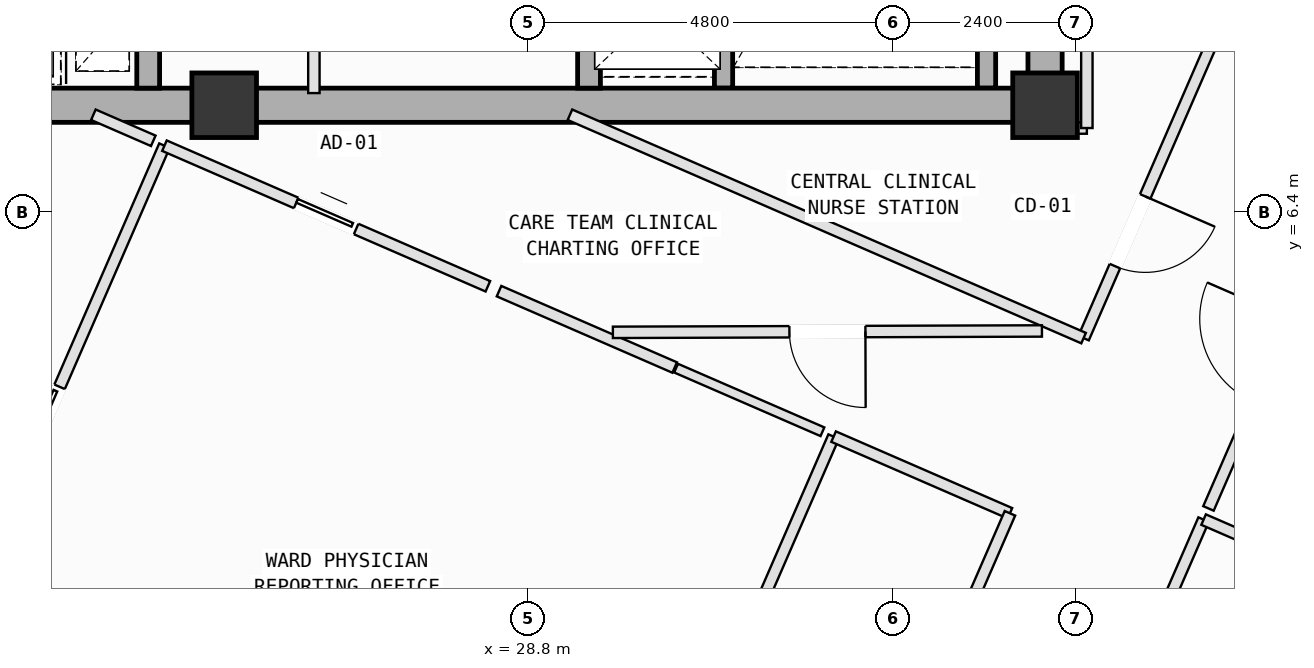
"""IFC4 building model, lengths in metres.
Left out: names, types, materials, properties, quantities, classifications, styles, units other than length and angle.
Written with IfcOpenShell. Run it as: python <this file> out.ifc"""

import sys

from ifc_helpers import new_model, si_unit, direction, frame, frame_2d, origin, origin_2d, place, context, subcontext, project, spatial, rectangle, extrude, element, fill, save


model = new_model("IFC4")
c1 = context("Model", 3, precision=1e-05, world=origin(), true_north=direction((0.0, 1.0)))
c2 = subcontext(c1, "Body", "Model", "MODEL_VIEW")
j1 = project(units=[si_unit("LENGTHUNIT", "METRE"), si_unit("PLANEANGLEUNIT", "RADIAN")], contexts=[c1])
p1 = place(None, origin())
s1 = spatial("IfcSite", under=j1, at=p1, CompositionType="ELEMENT")
p2 = place(p1, origin())
s2 = spatial("IfcBuilding", under=s1, at=p2, CompositionType="ELEMENT")
p3 = place(p2, frame((0.0, 0.0, 324.6)))
s3 = spatial("IfcBuildingStorey", under=s2, at=p3, CompositionType="ELEMENT", Elevation=324.6)
for number, where, z_axis, x_axis in (
    (1, (24.8, 7.8, 0.0), (0.0, 0.0, 1.0), (1.0, 0.0, 0.0)),
    (2, (35.6, 7.8, 0.0), (0.0, 0.0, 1.0), (1.0, 0.0, 0.0)),
):
    element("IfcColumn", number, at=place(p3, frame(where, z_axis=z_axis, x_axis=x_axis)), inside=s3, PredefinedType="COLUMN", context=c2, shape_type="SweptSolid", body=[
        extrude(rectangle(XDim=0.85, YDim=0.85, at=origin_2d()), origin(), (0.0, 0.0, 1.0), 4.0),
    ])
for number, where, z_axis, x_axis in (
    (3, (34.83, 15.12, 0.0), (0.0, 0.0, 1.0), (0.0, -1.0, 0.0)),
    (4, (31.37, 8.025, 0.0), (0.0, 0.0, 1.0), (0.0, 1.0, 0.0)),
):
    element("IfcWall", number, at=place(p3, frame(where, z_axis=z_axis, x_axis=x_axis)), inside=s3, PredefinedType="SOLIDWALL", context=c2, shape_type="SweptSolid", body=[
        extrude(rectangle(XDim=7.095, YDim=0.24, at=frame_2d((3.548, 0.0))), origin(), (0.0, 0.0, 1.0), 3.78),
    ])
for number, where, z_axis, x_axis in (
    (5, (14.0, 7.8, 0.0), (0.0, 0.0, 1.0), (1.0, 0.0, 0.0)),
    (6, (24.8, 7.8, 0.0), (0.0, 0.0, 1.0), (1.0, 0.0, 0.0)),
):
    element("IfcWall", number, at=place(p3, frame(where, z_axis=z_axis, x_axis=x_axis)), inside=s3, PredefinedType="SHEAR", context=c2, shape_type="SweptSolid", body=[
        extrude(rectangle(XDim=10.8, YDim=0.45, at=frame_2d((5.4, 0.0))), origin(), (0.0, 0.0, 1.0), 3.78),
    ])
p4 = place(p3, frame((35.6, 7.8, 0.0), z_axis=(0.0, 0.0, 1.0), x_axis=(0.0, 1.0, 0.0)))
e7 = element("IfcWall", 7, at=p4, inside=s3, PredefinedType="SHEAR", context=c2, shape_type="SweptSolid", body=[
    extrude(rectangle(XDim=9.0, YDim=0.45, at=frame_2d((4.5, 0.0))), origin(), (0.0, 0.0, 1.0), 3.78),
])
p5 = place(p3, frame((23.8, 8.025, 0.0), z_axis=(0.0, 0.0, 1.0), x_axis=(0.0, 1.0, 0.0)))
e8 = element("IfcWall", 8, at=p5, inside=s3, PredefinedType="SOLIDWALL", context=c2, shape_type="SweptSolid", body=[
    extrude(rectangle(XDim=2.655, YDim=0.3, at=frame_2d((1.328, 0.0))), origin(), (0.0, 0.0, 1.0), 3.78),
])
p6 = place(p3, frame((29.6, 8.025, 0.0), z_axis=(0.0, 0.0, 1.0), x_axis=(0.0, 1.0, 0.0)))
e9 = element("IfcWall", 9, at=p6, inside=s3, PredefinedType="SOLIDWALL", context=c2, shape_type="SweptSolid", body=[
    extrude(rectangle(XDim=1.995, YDim=0.3, at=frame_2d((0.998, 0.0))), origin(), (0.0, 0.0, 1.0), 3.78),
])
p7 = place(p3, frame((25.98, 7.96, 0.0), z_axis=(0.0, 0.0, 1.0), x_axis=(0.0, 1.0, 0.0)))
e10 = element("IfcWall", 10, at=p7, inside=s3, PredefinedType="PARTITIONING", context=c2, shape_type="SweptSolid", body=[
    extrude(rectangle(XDim=4.04, YDim=0.15, at=frame_2d((2.02, 0.0))), origin(), (0.0, 0.0, 1.0), 3.78),
])
p8 = place(p7, frame((1.695, 0.0, 0.0)))
e11 = element("IfcOpeningElement", 11, at=p8, cuts=e10, PredefinedType="OPENING", context=c2, shape_type="SweptSolid", body=[
    extrude(rectangle(XDim=1.0, YDim=2.12, at=frame_2d((0.5, 1.06))), frame((0.0, 0.085, 0.0), z_axis=(0.0, -1.0, 0.0), x_axis=(1.0, 0.0, 0.0)), (0.0, 0.0, 1.0), 0.17),
])
p9 = place(p3, frame((35.996, -1.54, 0.0), z_axis=(0.0, 0.0, 1.0), x_axis=(0.398633453706, 0.917110336648, 0.0)))
e12 = element("IfcWall", 12, at=p9, inside=s3, PredefinedType="PARTITIONING", context=c2, shape_type="SweptSolid", body=[
    extrude(rectangle(XDim=4.239, YDim=0.15, at=frame_2d((2.12, 0.0))), origin(), (0.0, 0.0, 1.0), 3.78),
])
p10 = place(p9, frame((1.52, 0.0, 0.0)))
e13 = element("IfcOpeningElement", 13, at=p10, cuts=e12, PredefinedType="OPENING", context=c2, shape_type="SweptSolid", body=[
    extrude(rectangle(XDim=1.2, YDim=2.15, at=frame_2d((0.6, 1.075))), frame((0.0, 0.085, 0.0), z_axis=(0.0, -1.0, 0.0), x_axis=(1.0, 0.0, 0.0)), (0.0, 0.0, 1.0), 0.17),
])
p11 = place(p3, frame((37.686, 2.348, 0.0), z_axis=(0.0, 0.0, 1.0), x_axis=(0.917079517358, -0.398704350167, 0.0)))
e14 = element("IfcWall", 14, at=p11, inside=s3, PredefinedType="PARTITIONING", context=c2, shape_type="SweptSolid", body=[
    extrude(rectangle(XDim=9.436, YDim=0.15, at=frame_2d((4.718, 0.0))), origin(), (0.0, 0.0, 1.0), 3.78),
])
p12 = place(p3, frame((37.75, 2.495, 0.0), z_axis=(0.0, 0.0, 1.0), x_axis=(0.398827178626, 0.917026107365, 0.0)))
e15 = element("IfcWall", 15, at=p12, inside=s3, PredefinedType="PARTITIONING", context=c2, shape_type="SweptSolid", body=[
    extrude(rectangle(XDim=4.24, YDim=0.15, at=frame_2d((2.12, 0.0))), origin(), (0.0, 0.0, 1.0), 3.78),
])
p13 = place(p12, frame((1.52, 0.0, 0.0)))
e16 = element("IfcOpeningElement", 16, at=p13, cuts=e15, PredefinedType="OPENING", context=c2, shape_type="SweptSolid", body=[
    extrude(rectangle(XDim=1.2, YDim=2.15, at=frame_2d((0.6, 1.075))), frame((0.0, 0.085, 0.0), z_axis=(0.0, -1.0, 0.0), x_axis=(1.0, 0.0, 0.0)), (0.0, 0.0, 1.0), 0.17),
])
p14 = place(p3, frame((29.853, -3.378, 0.0), z_axis=(0.0, 0.0, 1.0), x_axis=(0.398816165707, 0.917030896956, 0.0)))
e17 = element("IfcWall", 17, at=p14, inside=s3, PredefinedType="PARTITIONING", context=c2, shape_type="SweptSolid", body=[
    extrude(rectangle(XDim=7.435, YDim=0.15, at=frame_2d((3.717, 0.0))), origin(), (0.0, 0.0, 1.0), 3.78),
])
p15 = place(p3, frame((32.818, 3.44, 0.0), z_axis=(0.0, 0.0, 1.0), x_axis=(0.917010208472, -0.398863733068, 0.0)))
e18 = element("IfcWall", 18, at=p15, inside=s3, PredefinedType="PARTITIONING", context=c2, shape_type="SweptSolid", body=[
    extrude(rectangle(XDim=2.53, YDim=0.15, at=frame_2d((1.265, 0.0))), origin(), (0.0, 0.0, 1.0), 3.78),
])
p16 = place(p3, frame((35.138, 2.431, 0.0), z_axis=(0.0, 0.0, 1.0), x_axis=(-0.398810806125, -0.917033227816, 0.0)))
e19 = element("IfcWall", 19, at=p16, inside=s3, PredefinedType="PARTITIONING", context=c2, shape_type="SweptSolid", body=[
    extrude(rectangle(XDim=5.903, YDim=0.15, at=frame_2d((2.951, 0.0))), origin(), (0.0, 0.0, 1.0), 2.765),
])
p17 = place(p16, frame((2.351, 0.0, 0.0)))
e20 = element("IfcOpeningElement", 20, at=p17, cuts=e19, PredefinedType="OPENING", context=c2, shape_type="SweptSolid", body=[
    extrude(rectangle(XDim=1.2, YDim=2.15, at=frame_2d((0.6, 1.075))), frame((0.0, 0.085, 0.0), z_axis=(0.0, -1.0, 0.0), x_axis=(1.0, 0.0, 0.0)), (0.0, 0.0, 1.0), 0.17),
])
p18 = place(p3, frame((28.416, 5.354, 0.0), z_axis=(0.0, 0.0, 1.0), x_axis=(0.917057734147, -0.398754451062, 0.0)))
e21 = element("IfcWall", 21, at=p18, inside=s3, PredefinedType="PARTITIONING", context=c2, shape_type="SweptSolid", body=[
    extrude(rectangle(XDim=2.52, YDim=0.15, at=frame_2d((1.26, 0.0))), origin(), (0.0, 0.0, 1.0), 3.78),
])
p19 = place(p3, frame((30.745, 4.341, 0.0), z_axis=(0.0, 0.0, 1.0), x_axis=(0.917094083809, -0.398670843481, 0.0)))
e22 = element("IfcWall", 22, at=p19, inside=s3, PredefinedType="PARTITIONING", context=c2, shape_type="SweptSolid", body=[
    extrude(rectangle(XDim=2.1, YDim=0.125, at=frame_2d((1.05, 0.0))), origin(), (0.0, 0.0, 1.0), 3.78),
])
p20 = place(p3, frame((20.912, 0.134, 0.0), z_axis=(0.0, 0.0, 1.0), x_axis=(0.398731849313, 0.917067561493, 0.0)))
e23 = element("IfcWall", 23, at=p20, inside=s3, PredefinedType="PARTITIONING", context=c2, shape_type="SweptSolid", body=[
    extrude(rectangle(XDim=7.779, YDim=0.15, at=frame_2d((3.89, 0.0))), origin(), (0.0, 0.0, 1.0), 2.765),
])
p21 = place(p20, frame((3.46, 0.0, 0.0)))
e24 = element("IfcOpeningElement", 24, at=p21, cuts=e23, PredefinedType="OPENING", context=c2, shape_type="SweptSolid", body=[
    extrude(rectangle(XDim=0.86, YDim=2.06, at=frame_2d((0.43, 1.03))), frame((0.0, 0.085, 0.0), z_axis=(0.0, -1.0, 0.0), x_axis=(1.0, 0.0, 0.0)), (0.0, 0.0, 1.0), 0.17),
])
p22 = place(p3, frame((24.014, 7.268, 0.0), z_axis=(0.0, 0.0, 1.0), x_axis=(0.91706671013, -0.398733807411, 0.0)))
e25 = element("IfcWall", 25, at=p22, inside=s3, PredefinedType="PARTITIONING", context=c2, shape_type="SweptSolid", body=[
    extrude(rectangle(XDim=4.64, YDim=0.15, at=frame_2d((2.32, 0.0))), origin(), (0.0, 0.0, 1.0), 3.78),
])
p23 = place(p22, frame((1.89, 0.0, 0.0)))
e26 = element("IfcOpeningElement", 26, at=p23, cuts=e25, PredefinedType="OPENING", context=c2, shape_type="SweptSolid", body=[
    extrude(rectangle(XDim=0.86, YDim=2.06, at=frame_2d((0.43, 1.03))), frame((0.0, 0.085, 0.0), z_axis=(0.0, -1.0, 0.0), x_axis=(1.0, 0.0, 0.0)), (0.0, 0.0, 1.0), 0.17),
])
p24 = place(p3, frame((23.079, 7.675, 0.0), z_axis=(0.0, 0.0, 1.0), x_axis=(0.91686666905, -0.399193576082, 0.0)))
e27 = element("IfcWall", 27, at=p24, inside=s3, PredefinedType="PARTITIONING", context=c2, shape_type="SweptSolid", body=[
    extrude(rectangle(XDim=0.859, YDim=0.15, at=frame_2d((0.43, 0.0))), origin(), (0.0, 0.0, 1.0), 3.78),
])
p25 = place(p3, frame((38.035, 9.17, 0.0), z_axis=(0.0, 0.0, 1.0), x_axis=(-0.398764886009, -0.917053196759, 0.0)))
e28 = element("IfcWall", 28, at=p25, inside=s3, PredefinedType="PARTITIONING", context=c2, shape_type="SweptSolid", body=[
    extrude(rectangle(XDim=4.835, YDim=0.15, at=frame_2d((2.417, 0.0))), origin(), (0.0, 0.0, 1.0), 3.78),
])
p26 = place(p25, frame((2.802, 0.0, 0.0)))
e29 = element("IfcOpeningElement", 29, at=p26, cuts=e28, PredefinedType="OPENING", context=c2, shape_type="SweptSolid", body=[
    extrude(rectangle(XDim=1.0, YDim=2.12, at=frame_2d((0.5, 1.06))), frame((0.0, 0.085, 0.0), z_axis=(0.0, -1.0, 0.0), x_axis=(1.0, 0.0, 0.0)), (0.0, 0.0, 1.0), 0.17),
])
p27 = place(p3, frame((36.107, 4.736, 0.0), z_axis=(0.0, 0.0, 1.0), x_axis=(-0.917031075712, 0.398815754676, 0.0)))
e30 = element("IfcWall", 30, at=p27, inside=s3, PredefinedType="PARTITIONING", context=c2, shape_type="SweptSolid", body=[
    extrude(rectangle(XDim=7.369, YDim=0.15, at=frame_2d((3.685, 0.0))), origin(), (0.0, 0.0, 1.0), 3.78),
])
p28 = place(p3, frame((35.6, 7.5, 0.0), z_axis=(0.0, 0.0, 1.0), x_axis=(1.0, 0.0, 0.0)))
e31 = element("IfcWall", 31, at=p28, inside=s3, PredefinedType="PARTITIONING", context=c2, shape_type="SweptSolid", body=[
    extrude(rectangle(XDim=0.55, YDim=0.15, at=frame_2d((0.275, 0.0))), origin(), (0.0, 0.0, 1.0), 2.765),
])
p29 = place(p3, frame((36.15, 7.5, 0.0), z_axis=(0.0, 0.0, 1.0), x_axis=(0.0, 1.0, 0.0)))
e32 = element("IfcWall", 32, at=p29, inside=s3, PredefinedType="PARTITIONING", context=c2, shape_type="SweptSolid", body=[
    extrude(rectangle(XDim=3.082, YDim=0.15, at=frame_2d((1.541, 0.0))), origin(), (0.0, 0.0, 1.0), 3.78),
])
p30 = place(p3, frame((35.559, 4.83, 0.0), z_axis=(0.0, 0.0, 1.0), x_axis=(-0.999994878711, -0.003200398799, 0.0)))
e33 = element("IfcWall", 33, at=p30, inside=s3, PredefinedType="PARTITIONING", context=c2, shape_type="SweptSolid", body=[
    extrude(rectangle(XDim=5.645, YDim=0.15, at=frame_2d((2.823, 0.0))), origin(), (0.0, 0.0, 1.0), 3.78),
])
p31 = place(p30, frame((2.323, 0.0, 0.0)))
e34 = element("IfcOpeningElement", 34, at=p31, cuts=e33, PredefinedType="OPENING", context=c2, shape_type="SweptSolid", body=[
    extrude(rectangle(XDim=1.0, YDim=2.12, at=frame_2d((0.5, 1.06))), frame((0.0, 0.085, 0.0), z_axis=(0.0, -1.0, 0.0), x_axis=(1.0, 0.0, 0.0)), (0.0, 0.0, 1.0), 0.17),
])
p32 = place(p26, origin())
e35 = element("IfcDoor", 35, at=p32, inside=s3, OperationType="SINGLE_SWING_LEFT", PredefinedType="DOOR", context=c2, shape_type="SweptSolid", body=[
    extrude(rectangle(XDim=1.0, YDim=2.12, at=frame_2d((0.5, 1.06))), frame((0.0, 0.025, 0.0), z_axis=(0.0, -1.0, 0.0), x_axis=(1.0, 0.0, 0.0)), (0.0, 0.0, 1.0), 0.05),
])
fill(e29, e35)
p33 = place(p31, origin())
e36 = element("IfcDoor", 36, at=p33, inside=s3, OperationType="SINGLE_SWING_LEFT", PredefinedType="DOOR", context=c2, shape_type="SweptSolid", body=[
    extrude(rectangle(XDim=1.0, YDim=2.12, at=frame_2d((0.5, 1.06))), frame((0.0, 0.025, 0.0), z_axis=(0.0, -1.0, 0.0), x_axis=(1.0, 0.0, 0.0)), (0.0, 0.0, 1.0), 0.05),
])
fill(e34, e36)
p34 = place(p23, origin())
e37 = element("IfcDoor", 37, at=p34, inside=s3, OperationType="SLIDING_TO_LEFT", PredefinedType="DOOR", context=c2, shape_type="SweptSolid", body=[
    extrude(rectangle(XDim=0.86, YDim=2.06, at=frame_2d((0.43, 1.03))), frame((0.0, 0.025, 0.0), z_axis=(0.0, -1.0, 0.0), x_axis=(1.0, 0.0, 0.0)), (0.0, 0.0, 1.0), 0.05),
])
fill(e26, e37)
p35 = place(p21, origin())
e38 = element("IfcDoor", 38, at=p35, inside=s3, OperationType="SLIDING_TO_LEFT", PredefinedType="DOOR", context=c2, shape_type="SweptSolid", body=[
    extrude(rectangle(XDim=0.86, YDim=2.06, at=frame_2d((0.43, 1.03))), frame((0.0, 0.025, 0.0), z_axis=(0.0, -1.0, 0.0), x_axis=(1.0, 0.0, 0.0)), (0.0, 0.0, 1.0), 0.05),
])
fill(e24, e38)
save(model, sys.argv[1])
